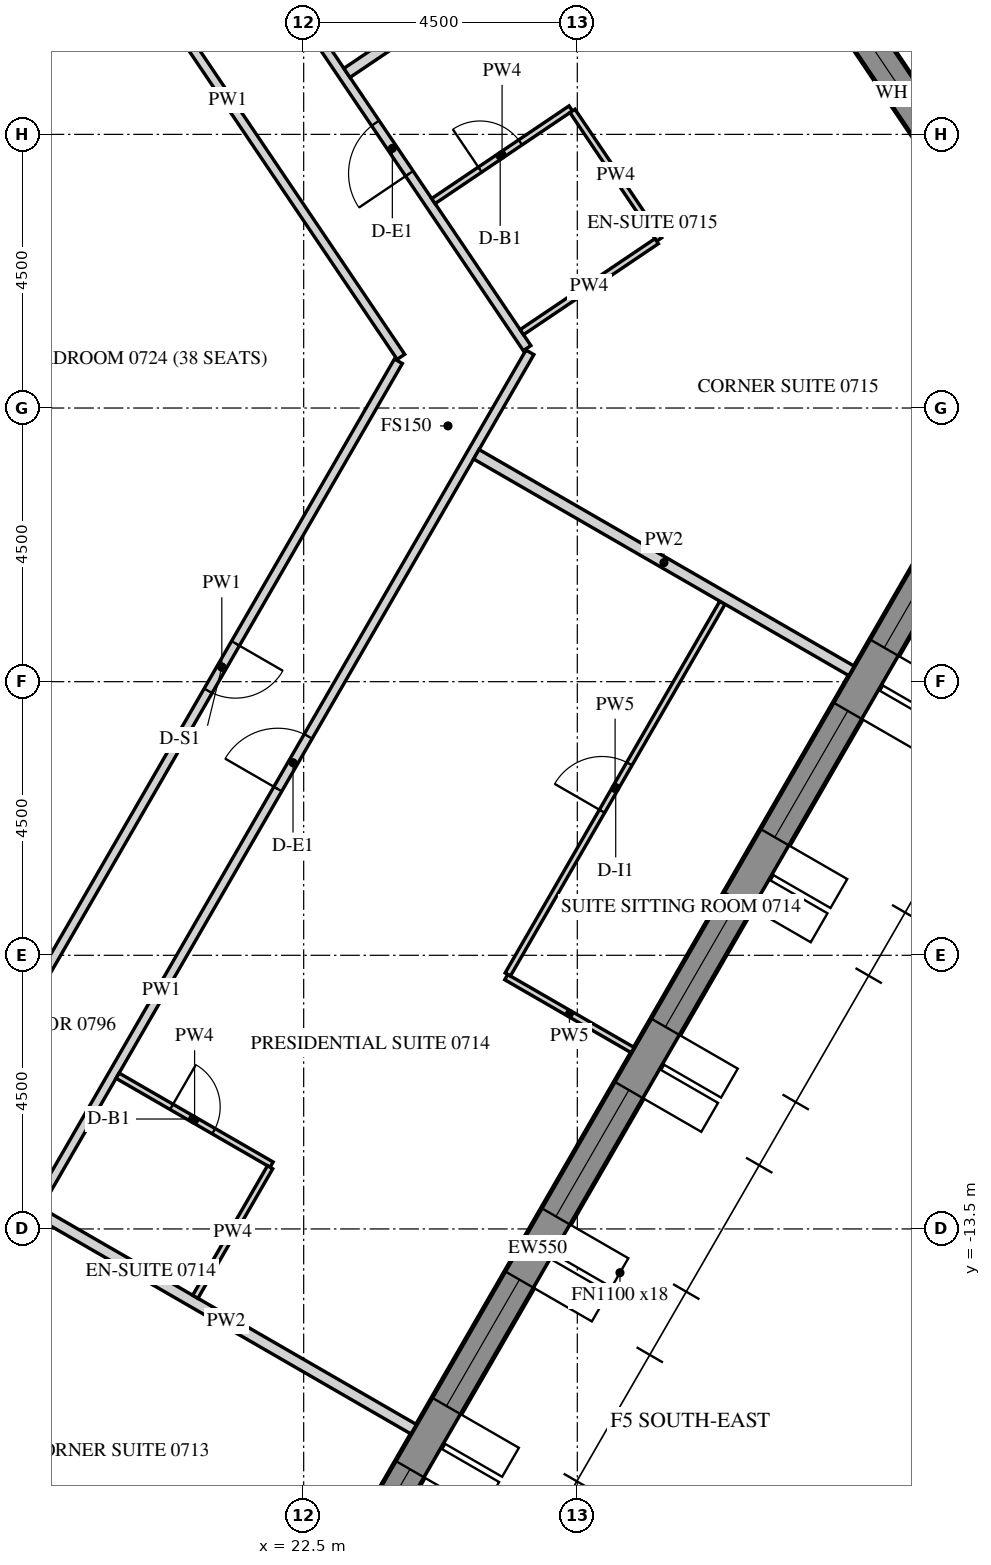
"""IFC4 building model, lengths in metres.
Left out: names, types, materials, properties, quantities, classifications, styles, units other than length and angle.
Written with IfcOpenShell. Run it as: python <this file> out.ifc"""

import sys

from ifc_helpers import new_model, si_unit, direction, frame, frame_2d, origin, place, context, subcontext, project, spatial, polyline, rectangle, outline, extrude, element, fill, save


model = new_model("IFC4")
c1 = context("Model", 3, precision=1e-05, world=origin(), true_north=direction((0.0, 1.0)))
c2 = subcontext(c1, "Body", "Model", "MODEL_VIEW")
j1 = project(units=[si_unit("LENGTHUNIT", "METRE"), si_unit("PLANEANGLEUNIT", "RADIAN")], contexts=[c1])
p1 = place(None, origin())
s1 = spatial("IfcSite", under=j1, at=p1, CompositionType="ELEMENT")
p2 = place(p1, origin())
s2 = spatial("IfcBuilding", under=s1, at=p2, CompositionType="ELEMENT")
p3 = place(p2, frame((0.0, 0.0, 99.9)))
s3 = spatial("IfcBuildingStorey", under=s2, at=p3, CompositionType="ELEMENT", Elevation=99.9)
p4 = place(p3, frame((18.83, -26.835, -0.15), z_axis=(0.0, 0.0, 1.0), x_axis=(0.500003800416, 0.866023209602, 0.0)))
e1 = element("IfcWall", 1, at=p4, inside=s3, PredefinedType="SOLIDWALL", context=c2, shape_type="SweptSolid", body=[
    extrude(outline(polyline([(-0.022, -0.275), (30.097, -0.275), (30.045, 0.275), (0.022, 0.275), (-0.022, -0.275)])), origin(), (0.0, 0.0, 1.0), 3.9),
])
p5 = place(p4, frame((1.236, 0.0, 1.05)))
e2 = element("IfcOpeningElement", 2, at=p5, cuts=e1, PredefinedType="OPENING", context=c2, shape_type="SweptSolid", body=[
    extrude(rectangle(XDim=2.4, YDim=2.4, at=frame_2d((1.2, 1.2))), frame((0.0, 0.285, 0.0), z_axis=(0.0, -1.0, 0.0), x_axis=(1.0, 0.0, 0.0)), (0.0, 0.0, 1.0), 0.57),
])
p6 = place(p4, frame((4.835, 0.0, 1.05)))
e3 = element("IfcOpeningElement", 3, at=p6, cuts=e1, PredefinedType="OPENING", context=c2, shape_type="SweptSolid", body=[
    extrude(rectangle(XDim=2.4, YDim=2.4, at=frame_2d((1.2, 1.2))), frame((0.0, 0.285, 0.0), z_axis=(0.0, -1.0, 0.0), x_axis=(1.0, 0.0, 0.0)), (0.0, 0.0, 1.0), 0.57),
])
p7 = place(p4, frame((8.436, 0.0, 1.05)))
e4 = element("IfcOpeningElement", 4, at=p7, cuts=e1, PredefinedType="OPENING", context=c2, shape_type="SweptSolid", body=[
    extrude(rectangle(XDim=2.4, YDim=2.4, at=frame_2d((1.2, 1.2))), frame((0.0, 0.285, 0.0), z_axis=(0.0, -1.0, 0.0), x_axis=(1.0, 0.0, 0.0)), (0.0, 0.0, 1.0), 0.57),
])
p8 = place(p4, frame((12.035, 0.0, 1.05)))
e5 = element("IfcOpeningElement", 5, at=p8, cuts=e1, PredefinedType="OPENING", context=c2, shape_type="SweptSolid", body=[
    extrude(rectangle(XDim=2.4, YDim=2.4, at=frame_2d((1.2, 1.2))), frame((0.0, 0.285, 0.0), z_axis=(0.0, -1.0, 0.0), x_axis=(1.0, 0.0, 0.0)), (0.0, 0.0, 1.0), 0.57),
])
p9 = place(p4, frame((15.635, 0.0, 1.05)))
e6 = element("IfcOpeningElement", 6, at=p9, cuts=e1, PredefinedType="OPENING", context=c2, shape_type="SweptSolid", body=[
    extrude(rectangle(XDim=2.4, YDim=2.4, at=frame_2d((1.2, 1.2))), frame((0.0, 0.285, 0.0), z_axis=(0.0, -1.0, 0.0), x_axis=(1.0, 0.0, 0.0)), (0.0, 0.0, 1.0), 0.57),
])
p10 = place(p4, frame((19.236, 0.0, 1.05)))
e7 = element("IfcOpeningElement", 7, at=p10, cuts=e1, PredefinedType="OPENING", context=c2, shape_type="SweptSolid", body=[
    extrude(rectangle(XDim=2.4, YDim=2.4, at=frame_2d((1.2, 1.2))), frame((0.0, 0.285, 0.0), z_axis=(0.0, -1.0, 0.0), x_axis=(1.0, 0.0, 0.0)), (0.0, 0.0, 1.0), 0.57),
])
p11 = place(p4, frame((22.835, 0.0, 1.05)))
e8 = element("IfcOpeningElement", 8, at=p11, cuts=e1, PredefinedType="OPENING", context=c2, shape_type="SweptSolid", body=[
    extrude(rectangle(XDim=2.4, YDim=2.4, at=frame_2d((1.2, 1.2))), frame((0.0, 0.285, 0.0), z_axis=(0.0, -1.0, 0.0), x_axis=(1.0, 0.0, 0.0)), (0.0, 0.0, 1.0), 0.57),
])
p12 = place(p4, frame((26.436, 0.0, 1.05)))
e9 = element("IfcOpeningElement", 9, at=p12, cuts=e1, PredefinedType="OPENING", context=c2, shape_type="SweptSolid", body=[
    extrude(rectangle(XDim=2.4, YDim=2.4, at=frame_2d((1.2, 1.2))), frame((0.0, 0.285, 0.0), z_axis=(0.0, -1.0, 0.0), x_axis=(1.0, 0.0, 0.0)), (0.0, 0.0, 1.0), 0.57),
])
p13 = place(p3, frame((33.728, 3.153, -0.15), z_axis=(0.0, 0.0, 1.0), x_axis=(-0.559192411416, 0.82903790445, 0.0)))
e10 = element("IfcWall", 10, at=p13, inside=s3, PredefinedType="SOLIDWALL", context=c2, shape_type="SweptSolid", body=[
    extrude(outline(polyline([(-0.026, -0.275), (30.093, -0.275), (30.048, 0.275), (0.026, 0.275), (-0.026, -0.275)])), origin(), (0.0, 0.0, 1.0), 3.9),
])
p14 = place(p13, frame((1.236, 0.0, 1.05)))
e11 = element("IfcOpeningElement", 11, at=p14, cuts=e10, PredefinedType="OPENING", context=c2, shape_type="SweptSolid", body=[
    extrude(rectangle(XDim=2.4, YDim=2.4, at=frame_2d((1.2, 1.2))), frame((0.0, 0.285, 0.0), z_axis=(0.0, -1.0, 0.0), x_axis=(1.0, 0.0, 0.0)), (0.0, 0.0, 1.0), 0.57),
])
p15 = place(p13, frame((4.835, 0.0, 1.05)))
e12 = element("IfcOpeningElement", 12, at=p15, cuts=e10, PredefinedType="OPENING", context=c2, shape_type="SweptSolid", body=[
    extrude(rectangle(XDim=2.4, YDim=2.4, at=frame_2d((1.2, 1.2))), frame((0.0, 0.285, 0.0), z_axis=(0.0, -1.0, 0.0), x_axis=(1.0, 0.0, 0.0)), (0.0, 0.0, 1.0), 0.57),
])
p16 = place(p13, frame((8.436, 0.0, 1.05)))
e13 = element("IfcOpeningElement", 13, at=p16, cuts=e10, PredefinedType="OPENING", context=c2, shape_type="SweptSolid", body=[
    extrude(rectangle(XDim=2.4, YDim=2.4, at=frame_2d((1.2, 1.2))), frame((0.0, 0.285, 0.0), z_axis=(0.0, -1.0, 0.0), x_axis=(1.0, 0.0, 0.0)), (0.0, 0.0, 1.0), 0.57),
])
p17 = place(p13, frame((12.035, 0.0, 1.05)))
e14 = element("IfcOpeningElement", 14, at=p17, cuts=e10, PredefinedType="OPENING", context=c2, shape_type="SweptSolid", body=[
    extrude(rectangle(XDim=2.4, YDim=2.4, at=frame_2d((1.2, 1.2))), frame((0.0, 0.285, 0.0), z_axis=(0.0, -1.0, 0.0), x_axis=(1.0, 0.0, 0.0)), (0.0, 0.0, 1.0), 0.57),
])
p18 = place(p13, frame((15.635, 0.0, 1.05)))
e15 = element("IfcOpeningElement", 15, at=p18, cuts=e10, PredefinedType="OPENING", context=c2, shape_type="SweptSolid", body=[
    extrude(rectangle(XDim=2.4, YDim=2.4, at=frame_2d((1.2, 1.2))), frame((0.0, 0.285, 0.0), z_axis=(0.0, -1.0, 0.0), x_axis=(1.0, 0.0, 0.0)), (0.0, 0.0, 1.0), 0.57),
])
p19 = place(p13, frame((19.236, 0.0, 1.05)))
e16 = element("IfcOpeningElement", 16, at=p19, cuts=e10, PredefinedType="OPENING", context=c2, shape_type="SweptSolid", body=[
    extrude(rectangle(XDim=2.4, YDim=2.4, at=frame_2d((1.2, 1.2))), frame((0.0, 0.285, 0.0), z_axis=(0.0, -1.0, 0.0), x_axis=(1.0, 0.0, 0.0)), (0.0, 0.0, 1.0), 0.57),
])
p20 = place(p13, frame((22.835, 0.0, 1.05)))
e17 = element("IfcOpeningElement", 17, at=p20, cuts=e10, PredefinedType="OPENING", context=c2, shape_type="SweptSolid", body=[
    extrude(rectangle(XDim=2.4, YDim=2.4, at=frame_2d((1.2, 1.2))), frame((0.0, 0.285, 0.0), z_axis=(0.0, -1.0, 0.0), x_axis=(1.0, 0.0, 0.0)), (0.0, 0.0, 1.0), 0.57),
])
p21 = place(p13, frame((26.436, 0.0, 1.05)))
e18 = element("IfcOpeningElement", 18, at=p21, cuts=e10, PredefinedType="OPENING", context=c2, shape_type="SweptSolid", body=[
    extrude(rectangle(XDim=2.4, YDim=2.4, at=frame_2d((1.2, 1.2))), frame((0.0, 0.285, 0.0), z_axis=(0.0, -1.0, 0.0), x_axis=(1.0, 0.0, 0.0)), (0.0, 0.0, 1.0), 0.57),
])
p22 = place(p3, frame((14.102, -20.075, 0.0), z_axis=(0.0, 0.0, 1.0), x_axis=(0.499996816197, 0.866027241946, 0.0)))
e19 = element("IfcWall", 19, at=p22, inside=s3, PredefinedType="PARTITIONING", context=c2, shape_type="SweptSolid", body=[
    extrude(rectangle(XDim=24.238, YDim=0.15, at=frame_2d((12.119, 0.0))), origin(), (0.0, 0.0, 1.0), 2.988),
])
p23 = place(p22, frame((4.729, 0.0, 0.0)))
e20 = element("IfcOpeningElement", 20, at=p23, cuts=e19, PredefinedType="OPENING", context=c2, shape_type="SweptSolid", body=[
    extrude(rectangle(XDim=1.0, YDim=2.1, at=frame_2d((0.5, 1.05))), frame((0.0, 0.085, 0.0), z_axis=(0.0, -1.0, 0.0), x_axis=(1.0, 0.0, 0.0)), (0.0, 0.0, 1.0), 0.17),
])
p24 = place(p22, frame((15.946, 0.0, 0.0)))
e21 = element("IfcOpeningElement", 21, at=p24, cuts=e19, PredefinedType="OPENING", context=c2, shape_type="SweptSolid", body=[
    extrude(rectangle(XDim=1.0, YDim=2.1, at=frame_2d((0.5, 1.05))), frame((0.0, 0.085, 0.0), z_axis=(0.0, -1.0, 0.0), x_axis=(1.0, 0.0, 0.0)), (0.0, 0.0, 1.0), 0.17),
])
p25 = place(p3, frame((26.174, 0.985, 0.0), z_axis=(0.0, 0.0, 1.0), x_axis=(-0.559192163771, 0.829038071488, 0.0)))
e22 = element("IfcWall", 22, at=p25, inside=s3, PredefinedType="PARTITIONING", context=c2, shape_type="SweptSolid", body=[
    extrude(rectangle(XDim=22.335, YDim=0.15, at=frame_2d((11.168, 0.0))), origin(), (0.0, 0.0, 1.0), 2.988),
])
p26 = place(p25, frame((3.463, 0.0, 0.0)))
e23 = element("IfcOpeningElement", 23, at=p26, cuts=e22, PredefinedType="OPENING", context=c2, shape_type="SweptSolid", body=[
    extrude(rectangle(XDim=1.0, YDim=2.1, at=frame_2d((0.5, 1.05))), frame((0.0, 0.085, 0.0), z_axis=(0.0, -1.0, 0.0), x_axis=(1.0, 0.0, 0.0)), (0.0, 0.0, 1.0), 0.17),
])
p27 = place(p25, frame((13.309, 0.0, 0.0)))
e24 = element("IfcOpeningElement", 24, at=p27, cuts=e22, PredefinedType="OPENING", context=c2, shape_type="SweptSolid", body=[
    extrude(rectangle(XDim=1.0, YDim=2.1, at=frame_2d((0.5, 1.05))), frame((0.0, 0.085, 0.0), z_axis=(0.0, -1.0, 0.0), x_axis=(1.0, 0.0, 0.0)), (0.0, 0.0, 1.0), 0.17),
])
p28 = place(p3, frame((18.4, 9.291, 0.0), z_axis=(0.0, 0.0, 1.0), x_axis=(0.559191829043, -0.829038297265, 0.0)))
e25 = element("IfcWall", 25, at=p28, inside=s3, PredefinedType="PARTITIONING", context=c2, shape_type="SweptSolid", body=[
    extrude(rectangle(XDim=10.192, YDim=0.15, at=frame_2d((5.096, 0.0))), origin(), (0.0, 0.0, 1.0), 2.988),
])
p29 = place(p3, frame((24.058, 0.769, 0.0), z_axis=(0.0, 0.0, 1.0), x_axis=(-0.499995346943, -0.866028090212, 0.0)))
e26 = element("IfcWall", 26, at=p29, inside=s3, PredefinedType="PARTITIONING", context=c2, shape_type="SweptSolid", body=[
    extrude(rectangle(XDim=11.616, YDim=0.15, at=frame_2d((5.808, 0.0))), origin(), (0.0, 0.0, 1.0), 2.988),
])
p30 = place(p29, frame((5.358, 0.0, 0.0)))
e27 = element("IfcOpeningElement", 27, at=p30, cuts=e26, PredefinedType="OPENING", context=c2, shape_type="SweptSolid", body=[
    extrude(rectangle(XDim=0.9, YDim=2.1, at=frame_2d((0.45, 1.05))), frame((0.0, 0.085, 0.0), z_axis=(0.0, -1.0, 0.0), x_axis=(1.0, 0.0, 0.0)), (0.0, 0.0, 1.0), 0.17),
])
p31 = place(p3, frame((24.31, -16.794, 0.0), z_axis=(0.0, 0.0, 1.0), x_axis=(-0.866024672353, 0.500001266874, 0.0)))
e28 = element("IfcWall", 28, at=p31, inside=s3, PredefinedType="PARTITIONING", context=c2, shape_type="SweptSolid", body=[
    extrude(rectangle(XDim=7.125, YDim=0.18, at=frame_2d((3.562, 0.0))), origin(), (0.0, 0.0, 1.0), 2.988),
])
p32 = place(p3, frame((19.439, -10.98, 0.0), z_axis=(0.0, 0.0, 1.0), x_axis=(0.866046596414, -0.499963291492, 0.0)))
e29 = element("IfcWall", 29, at=p32, inside=s3, PredefinedType="PARTITIONING", context=c2, shape_type="SweptSolid", body=[
    extrude(rectangle(XDim=2.925, YDim=0.1, at=frame_2d((1.462, 0.0))), origin(), (0.0, 0.0, 1.0), 2.988),
])
p33 = place(p32, frame((1.025, 0.0, 0.0)))
e30 = element("IfcOpeningElement", 30, at=p33, cuts=e29, PredefinedType="OPENING", context=c2, shape_type="SweptSolid", body=[
    extrude(rectangle(XDim=0.8, YDim=2.1, at=frame_2d((0.4, 1.05))), frame((0.0, 0.06, 0.0), z_axis=(0.0, -1.0, 0.0), x_axis=(1.0, 0.0, 0.0)), (0.0, 0.0, 1.0), 0.12),
])
p34 = place(p3, frame((21.948, -12.486, 0.0), z_axis=(0.0, 0.0, 1.0), x_axis=(-0.500003092839, -0.866023618125, 0.0)))
e31 = element("IfcWall", 31, at=p34, inside=s3, PredefinedType="PARTITIONING", context=c2, shape_type="SweptSolid", body=[
    extrude(rectangle(XDim=2.46, YDim=0.1, at=frame_2d((1.23, 0.0))), origin(), (0.0, 0.0, 1.0), 2.988),
])
p35 = place(p3, frame((27.91, -10.559, 0.0), z_axis=(0.0, 0.0, 1.0), x_axis=(-0.865980596518, 0.500077600433, 0.0)))
e32 = element("IfcWall", 32, at=p35, inside=s3, PredefinedType="PARTITIONING", context=c2, shape_type="SweptSolid", body=[
    extrude(rectangle(XDim=2.4, YDim=0.1, at=frame_2d((1.2, 0.0))), origin(), (0.0, 0.0, 1.0), 2.988),
])
p36 = place(p3, frame((25.856, -9.315, 0.0), z_axis=(0.0, 0.0, 1.0), x_axis=(0.500010820671, 0.866019156377, 0.0)))
e33 = element("IfcWall", 33, at=p36, inside=s3, PredefinedType="PARTITIONING", context=c2, shape_type="SweptSolid", body=[
    extrude(rectangle(XDim=7.06, YDim=0.1, at=frame_2d((3.53, 0.0))), origin(), (0.0, 0.0, 1.0), 2.988),
])
p37 = place(p36, frame((3.1, 0.0, 0.0)))
e34 = element("IfcOpeningElement", 34, at=p37, cuts=e33, PredefinedType="OPENING", context=c2, shape_type="SweptSolid", body=[
    extrude(rectangle(XDim=0.9, YDim=2.1, at=frame_2d((0.45, 1.05))), frame((0.0, 0.06, 0.0), z_axis=(0.0, -1.0, 0.0), x_axis=(1.0, 0.0, 0.0)), (0.0, 0.0, 1.0), 0.12),
])
p38 = place(p3, frame((31.51, -4.323, 0.0), z_axis=(0.0, 0.0, 1.0), x_axis=(-0.866009834831, 0.500026965249, 0.0)))
e35 = element("IfcWall", 35, at=p38, inside=s3, PredefinedType="PARTITIONING", context=c2, shape_type="SweptSolid", body=[
    extrude(rectangle(XDim=7.125, YDim=0.18, at=frame_2d((3.562, 0.0))), origin(), (0.0, 0.0, 1.0), 2.988),
])
p39 = place(p3, frame((24.633, 3.403, 0.0), z_axis=(0.0, 0.0, 1.0), x_axis=(0.829047014003, 0.559178905694, 0.0)))
e36 = element("IfcWall", 36, at=p39, inside=s3, PredefinedType="PARTITIONING", context=c2, shape_type="SweptSolid", body=[
    extrude(rectangle(XDim=2.725, YDim=0.1, at=frame_2d((1.362, 0.0))), origin(), (0.0, 0.0, 1.0), 2.988),
])
p40 = place(p39, frame((0.925, 0.0, 0.0)))
e37 = element("IfcOpeningElement", 37, at=p40, cuts=e36, PredefinedType="OPENING", context=c2, shape_type="SweptSolid", body=[
    extrude(rectangle(XDim=0.8, YDim=2.1, at=frame_2d((0.4, 1.05))), frame((0.0, 0.06, 0.0), z_axis=(0.0, -1.0, 0.0), x_axis=(1.0, 0.0, 0.0)), (0.0, 0.0, 1.0), 0.12),
])
p41 = place(p3, frame((26.92, 4.885, 0.0), z_axis=(0.0, 0.0, 1.0), x_axis=(0.559221247909, -0.829018453285, 0.0)))
e38 = element("IfcWall", 38, at=p41, inside=s3, PredefinedType="PARTITIONING", context=c2, shape_type="SweptSolid", body=[
    extrude(rectangle(XDim=2.55, YDim=0.1, at=frame_2d((1.275, 0.0))), origin(), (0.0, 0.0, 1.0), 2.988),
])
p42 = place(p3, frame((28.305, 2.744, 0.0), z_axis=(0.0, 0.0, 1.0), x_axis=(-0.82904753069, -0.559178139645, 0.0)))
e39 = element("IfcWall", 39, at=p42, inside=s3, PredefinedType="PARTITIONING", context=c2, shape_type="SweptSolid", body=[
    extrude(rectangle(XDim=2.675, YDim=0.1, at=frame_2d((1.337, 0.0))), origin(), (0.0, 0.0, 1.0), 2.988),
])
p43 = place(p3, frame((29.119, 9.495, 0.0), z_axis=(0.0, 0.0, 1.0), x_axis=(-0.829049225145, -0.559175627408, 0.0)))
e40 = element("IfcWall", 40, at=p43, inside=s3, PredefinedType="PARTITIONING", context=c2, shape_type="SweptSolid", body=[
    extrude(rectangle(XDim=7.125, YDim=0.18, at=frame_2d((3.562, 0.0))), origin(), (0.0, 0.0, 1.0), 2.988),
])
p44 = place(p7, frame((0.0, 0.205, 0.0)))
e41 = element("IfcWindow", 41, at=p44, inside=s3, PartitioningType="DOUBLE_PANEL_VERTICAL", PredefinedType="WINDOW", context=c2, shape_type="SweptSolid", body=[
    extrude(rectangle(XDim=2.4, YDim=2.4, at=frame_2d((1.2, 1.2))), frame((0.0, 0.03, 0.0), z_axis=(0.0, -1.0, 0.0), x_axis=(1.0, 0.0, 0.0)), (0.0, 0.0, 1.0), 0.06),
])
fill(e4, e41)
p45 = place(p8, frame((0.0, 0.205, 0.0)))
e42 = element("IfcWindow", 42, at=p45, inside=s3, PartitioningType="DOUBLE_PANEL_VERTICAL", PredefinedType="WINDOW", context=c2, shape_type="SweptSolid", body=[
    extrude(rectangle(XDim=2.4, YDim=2.4, at=frame_2d((1.2, 1.2))), frame((0.0, 0.03, 0.0), z_axis=(0.0, -1.0, 0.0), x_axis=(1.0, 0.0, 0.0)), (0.0, 0.0, 1.0), 0.06),
])
fill(e5, e42)
p46 = place(p9, frame((0.0, 0.205, 0.0)))
e43 = element("IfcWindow", 43, at=p46, inside=s3, PartitioningType="DOUBLE_PANEL_VERTICAL", PredefinedType="WINDOW", context=c2, shape_type="SweptSolid", body=[
    extrude(rectangle(XDim=2.4, YDim=2.4, at=frame_2d((1.2, 1.2))), frame((0.0, 0.03, 0.0), z_axis=(0.0, -1.0, 0.0), x_axis=(1.0, 0.0, 0.0)), (0.0, 0.0, 1.0), 0.06),
])
fill(e6, e43)
p47 = place(p10, frame((0.0, 0.205, 0.0)))
e44 = element("IfcWindow", 44, at=p47, inside=s3, PartitioningType="DOUBLE_PANEL_VERTICAL", PredefinedType="WINDOW", context=c2, shape_type="SweptSolid", body=[
    extrude(rectangle(XDim=2.4, YDim=2.4, at=frame_2d((1.2, 1.2))), frame((0.0, 0.03, 0.0), z_axis=(0.0, -1.0, 0.0), x_axis=(1.0, 0.0, 0.0)), (0.0, 0.0, 1.0), 0.06),
])
fill(e7, e44)
p48 = place(p11, frame((0.0, 0.205, 0.0)))
e45 = element("IfcWindow", 45, at=p48, inside=s3, PartitioningType="DOUBLE_PANEL_VERTICAL", PredefinedType="WINDOW", context=c2, shape_type="SweptSolid", body=[
    extrude(rectangle(XDim=2.4, YDim=2.4, at=frame_2d((1.2, 1.2))), frame((0.0, 0.03, 0.0), z_axis=(0.0, -1.0, 0.0), x_axis=(1.0, 0.0, 0.0)), (0.0, 0.0, 1.0), 0.06),
])
fill(e8, e45)
p49 = place(p12, frame((0.0, 0.205, 0.0)))
e46 = element("IfcWindow", 46, at=p49, inside=s3, PartitioningType="DOUBLE_PANEL_VERTICAL", PredefinedType="WINDOW", context=c2, shape_type="SweptSolid", body=[
    extrude(rectangle(XDim=2.4, YDim=2.4, at=frame_2d((1.2, 1.2))), frame((0.0, 0.03, 0.0), z_axis=(0.0, -1.0, 0.0), x_axis=(1.0, 0.0, 0.0)), (0.0, 0.0, 1.0), 0.06),
])
fill(e9, e46)
p50 = place(p14, frame((0.0, 0.205, 0.0)))
e47 = element("IfcWindow", 47, at=p50, inside=s3, PartitioningType="DOUBLE_PANEL_VERTICAL", PredefinedType="WINDOW", context=c2, shape_type="SweptSolid", body=[
    extrude(rectangle(XDim=2.4, YDim=2.4, at=frame_2d((1.2, 1.2))), frame((0.0, 0.03, 0.0), z_axis=(0.0, -1.0, 0.0), x_axis=(1.0, 0.0, 0.0)), (0.0, 0.0, 1.0), 0.06),
])
fill(e11, e47)
p51 = place(p24, origin())
e48 = element("IfcDoor", 48, at=p51, inside=s3, OperationType="SINGLE_SWING_LEFT", PredefinedType="DOOR", context=c2, shape_type="SweptSolid", body=[
    extrude(rectangle(XDim=1.0, YDim=2.1, at=frame_2d((0.5, 1.05))), frame((0.0, 0.025, 0.0), z_axis=(0.0, -1.0, 0.0), x_axis=(1.0, 0.0, 0.0)), (0.0, 0.0, 1.0), 0.05),
])
fill(e21, e48)
p52 = place(p33, origin())
e49 = element("IfcDoor", 49, at=p52, inside=s3, OperationType="SINGLE_SWING_RIGHT", PredefinedType="DOOR", context=c2, shape_type="SweptSolid", body=[
    extrude(rectangle(XDim=0.8, YDim=2.1, at=frame_2d((0.4, 1.05))), frame((0.0, 0.025, 0.0), z_axis=(0.0, -1.0, 0.0), x_axis=(1.0, 0.0, 0.0)), (0.0, 0.0, 1.0), 0.05),
])
fill(e30, e49)
p53 = place(p37, origin())
e50 = element("IfcDoor", 50, at=p53, inside=s3, OperationType="SINGLE_SWING_RIGHT", PredefinedType="DOOR", context=c2, shape_type="SweptSolid", body=[
    extrude(rectangle(XDim=0.9, YDim=2.1, at=frame_2d((0.45, 1.05))), frame((0.0, 0.025, 0.0), z_axis=(0.0, -1.0, 0.0), x_axis=(1.0, 0.0, 0.0)), (0.0, 0.0, 1.0), 0.05),
])
fill(e34, e50)
p54 = place(p26, origin())
e51 = element("IfcDoor", 51, at=p54, inside=s3, OperationType="SINGLE_SWING_LEFT", PredefinedType="DOOR", context=c2, shape_type="SweptSolid", body=[
    extrude(rectangle(XDim=1.0, YDim=2.1, at=frame_2d((0.5, 1.05))), frame((0.0, 0.025, 0.0), z_axis=(0.0, -1.0, 0.0), x_axis=(1.0, 0.0, 0.0)), (0.0, 0.0, 1.0), 0.05),
])
fill(e23, e51)
p55 = place(p40, origin())
e52 = element("IfcDoor", 52, at=p55, inside=s3, OperationType="SINGLE_SWING_RIGHT", PredefinedType="DOOR", context=c2, shape_type="SweptSolid", body=[
    extrude(rectangle(XDim=0.8, YDim=2.1, at=frame_2d((0.4, 1.05))), frame((0.0, 0.025, 0.0), z_axis=(0.0, -1.0, 0.0), x_axis=(1.0, 0.0, 0.0)), (0.0, 0.0, 1.0), 0.05),
])
fill(e37, e52)
p56 = place(p30, origin())
e53 = element("IfcDoor", 53, at=p56, inside=s3, OperationType="SINGLE_SWING_LEFT", PredefinedType="DOOR", context=c2, shape_type="SweptSolid", body=[
    extrude(rectangle(XDim=0.9, YDim=2.1, at=frame_2d((0.45, 1.05))), frame((0.0, 0.025, 0.0), z_axis=(0.0, -1.0, 0.0), x_axis=(1.0, 0.0, 0.0)), (0.0, 0.0, 1.0), 0.05),
])
fill(e27, e53)
save(model, sys.argv[1])
